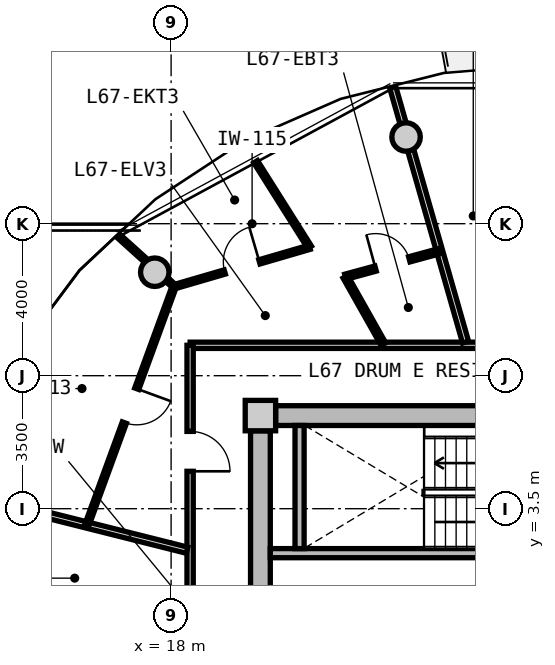
"""IFC4 building model, lengths in metres.
Left out: names, types, materials, properties, quantities, classifications, styles, units other than length and angle.
Written with IfcOpenShell. Run it as: python <this file> out.ifc"""

import sys

from ifc_helpers import new_model, si_unit, direction, frame, frame_2d, origin, origin_2d, place, context, subcontext, project, spatial, rectangle, circle, extrude, source, transform, mapped, element, fill, save


model = new_model("IFC4")
c1 = context("Model", 3, precision=1e-05, world=origin(), true_north=direction((0.0, 1.0)))
c2 = subcontext(c1, "Body", "Model", "MODEL_VIEW")
j1 = project(units=[si_unit("LENGTHUNIT", "METRE"), si_unit("PLANEANGLEUNIT", "RADIAN")], contexts=[c1])
p1 = place(None, origin())
s1 = spatial("IfcSite", under=j1, at=p1, CompositionType="ELEMENT")
p2 = place(p1, origin())
s2 = spatial("IfcBuilding", under=s1, at=p2, CompositionType="ELEMENT")
p3 = place(p2, frame((0.0, 0.0, 216.95)))
s3 = spatial("IfcBuildingStorey", under=s2, at=p3, CompositionType="ELEMENT", Elevation=216.95)
m1 = source(origin(), c2, "Body", "SweptSolid", [
    extrude(rectangle(XDim=0.8, YDim=0.8, at=origin_2d()), origin(), (0.0, 0.0, 1.0), 3.05),
])
p4 = place(p3, frame((20.35, 5.95, 0.0), z_axis=(0.0, 0.0, 1.0), x_axis=(1.0, 0.0, 0.0)))
e1 = element("IfcColumn", 1, at=p4, inside=s3, PredefinedType="COLUMN", context=c2, shape_type="MappedRepresentation", body=[
    mapped(m1, transform((0.0, 0.0, 0.0), x_axis=(1.0, 0.0, 0.0), y_axis=(0.0, 1.0, 0.0), z_axis=(0.0, 0.0, 1.0), scale=1.0)),
])
m2 = source(origin(), c2, "Body", "SweptSolid", [
    extrude(rectangle(XDim=14.5, YDim=0.52, at=frame_2d((7.25, 0.0))), origin(), (0.0, 0.0, 1.0), 2.76),
])
p5 = place(p3, frame((20.75, 5.95, 0.0), z_axis=(0.0, 0.0, 1.0), x_axis=(1.0, 0.0, 0.0)))
e2 = element("IfcWall", 2, at=p5, inside=s3, PredefinedType="SHEAR", context=c2, shape_type="MappedRepresentation", body=[
    mapped(m2, transform((0.0, 0.0, 0.0), x_axis=(1.0, 0.0, 0.0), y_axis=(0.0, 1.0, 0.0), z_axis=(0.0, 0.0, 1.0), scale=1.0)),
])
m3 = source(origin(), c2, "Body", "SweptSolid", [
    extrude(rectangle(XDim=11.1, YDim=0.52, at=frame_2d((5.55, 0.0))), origin(), (0.0, 0.0, 1.0), 2.76),
])
p6 = place(p3, frame((20.35, -5.55, 0.0), z_axis=(0.0, 0.0, 1.0), x_axis=(0.0, 1.0, 0.0)))
e3 = element("IfcWall", 3, at=p6, inside=s3, PredefinedType="SHEAR", context=c2, shape_type="MappedRepresentation", body=[
    mapped(m3, transform((0.0, 0.0, 0.0), x_axis=(1.0, 0.0, 0.0), y_axis=(0.0, 1.0, 0.0), z_axis=(0.0, 0.0, 1.0), scale=1.0)),
])
p7 = place(p6, frame((3.8, 0.0, 0.0)))
e4 = element("IfcOpeningElement", 4, at=p7, cuts=e3, PredefinedType="OPENING", context=c2, shape_type="SweptSolid", body=[
    extrude(rectangle(XDim=1.2, YDim=2.15, at=frame_2d((0.6, 1.075))), frame((0.0, 0.27, 0.0), z_axis=(0.0, -1.0, 0.0), x_axis=(1.0, 0.0, 0.0)), (0.0, 0.0, 1.0), 0.54),
])
m4 = source(origin(), c2, "Body", "SweptSolid", [
    extrude(circle(Radius=0.375, at=origin_2d()), origin(), (0.0, 0.0, 1.0), 3.05),
])
for number, where, z_axis, x_axis in (
    (5, (24.182, 13.281, 0.0), (0.0, 0.0, 1.0), (1.0, 0.0, 0.0)),
    (6, (17.57, 9.723, 0.0), (0.0, 0.0, 1.0), (1.0, 0.0, 0.0)),
):
    element("IfcColumn", number, at=place(p3, frame(where, z_axis=z_axis, x_axis=x_axis)), inside=s3, PredefinedType="COLUMN", context=c2, shape_type="MappedRepresentation", body=[
        mapped(m4, transform((0.0, 0.0, 0.0), x_axis=(1.0, 0.0, 0.0), y_axis=(0.0, 1.0, 0.0), z_axis=(0.0, 0.0, 1.0), scale=1.0)),
    ])
m5 = source(origin(), c2, "Body", "SweptSolid", [
    extrude(rectangle(XDim=7.93, YDim=0.24, at=frame_2d((3.965, 0.0))), origin(), (0.0, 0.0, 1.0), 2.76),
])
p8 = place(p3, frame((20.61, 2.33, 0.0), z_axis=(0.0, 0.0, 1.0), x_axis=(1.0, 0.0, 0.0)))
e7 = element("IfcWall", 7, at=p8, inside=s3, PredefinedType="PARTITIONING", context=c2, shape_type="MappedRepresentation", body=[
    mapped(m5, transform((0.0, 0.0, 0.0), x_axis=(1.0, 0.0, 0.0), y_axis=(0.0, 1.0, 0.0), z_axis=(0.0, 0.0, 1.0), scale=1.0)),
])
m6 = source(origin(), c2, "Body", "SweptSolid", [
    extrude(rectangle(XDim=3.24, YDim=0.24, at=frame_2d((1.62, 0.0))), origin(), (0.0, 0.0, 1.0), 2.76),
])
p9 = place(p3, frame((21.38, 2.45, 0.0), z_axis=(0.0, 0.0, 1.0), x_axis=(0.0, 1.0, 0.0)))
e8 = element("IfcWall", 8, at=p9, inside=s3, PredefinedType="PARTITIONING", context=c2, shape_type="MappedRepresentation", body=[
    mapped(m6, transform((0.0, 0.0, 0.0), x_axis=(1.0, 0.0, 0.0), y_axis=(0.0, 1.0, 0.0), z_axis=(0.0, 0.0, 1.0), scale=1.0)),
])
m7 = source(origin(), c2, "Body", "SweptSolid", [
    extrude(rectangle(XDim=8.58, YDim=0.165, at=frame_2d((4.29, 0.0))), origin(), (0.0, 0.0, 1.0), 2.745),
])
p10 = place(p3, frame((18.5, 7.8, 0.0), z_axis=(0.0, 0.0, 1.0), x_axis=(1.0, 0.0, 0.0)))
e9 = element("IfcWall", 9, at=p10, inside=s3, PredefinedType="PARTITIONING", context=c2, shape_type="MappedRepresentation", body=[
    mapped(m7, transform((0.0, 0.0, 0.0), x_axis=(1.0, 0.0, 0.0), y_axis=(0.0, 1.0, 0.0), z_axis=(0.0, 0.0, 1.0), scale=1.0)),
])
m8 = source(origin(), c2, "Body", "SweptSolid", [
    extrude(rectangle(XDim=6.88, YDim=0.165, at=frame_2d((3.44, 0.0))), origin(), (0.0, 0.0, 1.0), 2.745),
])
p11 = place(p3, frame((18.5, 0.92, 0.0), z_axis=(0.0, 0.0, 1.0), x_axis=(0.0, 1.0, 0.0)))
e10 = element("IfcWall", 10, at=p11, inside=s3, PredefinedType="PARTITIONING", context=c2, shape_type="MappedRepresentation", body=[
    mapped(m8, transform((0.0, 0.0, 0.0), x_axis=(1.0, 0.0, 0.0), y_axis=(0.0, 1.0, 0.0), z_axis=(0.0, 0.0, 1.0), scale=1.0)),
])
p12 = place(p11, frame((3.564, 0.0, 0.0)))
e11 = element("IfcOpeningElement", 11, at=p12, cuts=e10, PredefinedType="OPENING", context=c2, shape_type="SweptSolid", body=[
    extrude(rectangle(XDim=1.05, YDim=2.15, at=frame_2d((0.525, 1.075))), frame((0.0, 0.093, 0.0), z_axis=(0.0, -1.0, 0.0), x_axis=(1.0, 0.0, 0.0)), (0.0, 0.0, 1.0), 0.185),
])
m9 = source(origin(), c2, "Body", "SweptSolid", [
    extrude(rectangle(XDim=6.974, YDim=0.165, at=frame_2d((3.487, 0.0))), origin(), (0.0, 0.0, 1.0), 2.345),
])
p13 = place(p3, frame((25.749, 7.88, 0.0), z_axis=(0.0, 0.0, 1.0), x_axis=(-0.274707256801, 0.961527910703, 0.0)))
e12 = element("IfcWall", 12, at=p13, inside=s3, PredefinedType="PARTITIONING", context=c2, shape_type="MappedRepresentation", body=[
    mapped(m9, transform((0.0, 0.0, 0.0), x_axis=(1.0, 0.0, 0.0), y_axis=(0.0, 1.0, 0.0), z_axis=(0.0, 0.0, 1.0), scale=1.0)),
])
m10 = source(origin(), c2, "Body", "SweptSolid", [
    extrude(rectangle(XDim=6.157, YDim=0.165, at=frame_2d((3.079, 0.0))), origin(), (0.0, 0.0, 1.0), 2.345),
])
p14 = place(p3, frame((18.42, 2.407, 0.0), z_axis=(0.0, 0.0, 1.0), x_axis=(-0.969840867184, 0.243738984038, 0.0)))
e13 = element("IfcWall", 13, at=p14, inside=s3, PredefinedType="PARTITIONING", context=c2, shape_type="MappedRepresentation", body=[
    mapped(m10, transform((0.0, 0.0, 0.0), x_axis=(1.0, 0.0, 0.0), y_axis=(0.0, 1.0, 0.0), z_axis=(0.0, 0.0, 1.0), scale=1.0)),
])
m11 = source(origin(), c2, "Body", "SweptSolid", [
    extrude(rectangle(XDim=6.69, YDim=0.115, at=frame_2d((3.345, 0.0))), origin(), (0.0, 0.0, 1.0), 2.745),
])
p15 = place(p3, frame((18.083, 9.352, 0.0), z_axis=(0.0, 0.0, 1.0), x_axis=(-0.343693784919, -0.939081776102, 0.0)))
e14 = element("IfcWall", 14, at=p15, inside=s3, PredefinedType="PARTITIONING", context=c2, shape_type="MappedRepresentation", body=[
    mapped(m11, transform((0.0, 0.0, 0.0), x_axis=(1.0, 0.0, 0.0), y_axis=(0.0, 1.0, 0.0), z_axis=(0.0, 0.0, 1.0), scale=1.0)),
])
p16 = place(p15, frame((2.87, 0.0, 0.0)))
e15 = element("IfcOpeningElement", 15, at=p16, cuts=e14, PredefinedType="OPENING", context=c2, shape_type="SweptSolid", body=[
    extrude(rectangle(XDim=0.95, YDim=2.1, at=frame_2d((0.475, 1.05))), frame((0.0, 0.067, 0.0), z_axis=(0.0, -1.0, 0.0), x_axis=(1.0, 0.0, 0.0)), (0.0, 0.0, 1.0), 0.135),
])
m12 = source(origin(), c2, "Body", "SweptSolid", [
    extrude(rectangle(XDim=1.977, YDim=0.115, at=frame_2d((0.989, 0.0))), origin(), (0.0, 0.0, 1.0), 2.345),
])
p17 = place(p3, frame((18.083, 9.352, 0.0), z_axis=(0.0, 0.0, 1.0), x_axis=(-0.742064998629, 0.670327933037, 0.0)))
e16 = element("IfcWall", 16, at=p17, inside=s3, PredefinedType="PARTITIONING", context=c2, shape_type="MappedRepresentation", body=[
    mapped(m12, transform((0.0, 0.0, 0.0), x_axis=(1.0, 0.0, 0.0), y_axis=(0.0, 1.0, 0.0), z_axis=(0.0, 0.0, 1.0), scale=1.0)),
])
m13 = source(origin(), c2, "Body", "SweptSolid", [
    extrude(rectangle(XDim=2.035, YDim=0.14, at=frame_2d((1.018, 0.0))), origin(), (0.0, 0.0, 1.0), 2.745),
])
p18 = place(p3, frame((23.585, 7.83, 0.0), z_axis=(0.0, 0.0, 1.0), x_axis=(-0.491092509169, 0.871107425888, 0.0)))
e17 = element("IfcWall", 17, at=p18, inside=s3, PredefinedType="PARTITIONING", context=c2, shape_type="MappedRepresentation", body=[
    mapped(m13, transform((0.0, 0.0, 0.0), x_axis=(1.0, 0.0, 0.0), y_axis=(0.0, 1.0, 0.0), z_axis=(0.0, 0.0, 1.0), scale=1.0)),
])
m14 = source(origin(), c2, "Body", "SweptSolid", [
    extrude(rectangle(XDim=2.568, YDim=0.14, at=frame_2d((1.284, 0.0))), origin(), (0.0, 0.0, 1.0), 2.745),
])
p19 = place(p3, frame((22.585, 9.603, 0.0), z_axis=(0.0, 0.0, 1.0), x_axis=(0.964796726679, 0.262996722775, 0.0)))
e18 = element("IfcWall", 18, at=p19, inside=s3, PredefinedType="PARTITIONING", context=c2, shape_type="MappedRepresentation", body=[
    mapped(m14, transform((0.0, 0.0, 0.0), x_axis=(1.0, 0.0, 0.0), y_axis=(0.0, 1.0, 0.0), z_axis=(0.0, 0.0, 1.0), scale=1.0)),
])
p20 = place(p19, frame((0.824, 0.0, 0.0)))
e19 = element("IfcOpeningElement", 19, at=p20, cuts=e18, PredefinedType="OPENING", context=c2, shape_type="SweptSolid", body=[
    extrude(rectangle(XDim=0.92, YDim=2.1, at=frame_2d((0.46, 1.05))), frame((0.0, 0.08, 0.0), z_axis=(0.0, -1.0, 0.0), x_axis=(1.0, 0.0, 0.0)), (0.0, 0.0, 1.0), 0.16),
])
m15 = source(origin(), c2, "Body", "SweptSolid", [
    extrude(rectangle(XDim=2.662, YDim=0.115, at=frame_2d((1.331, 0.0))), origin(), (0.0, 0.0, 1.0), 2.745),
])
p21 = place(p3, frame((21.645, 10.38, 0.0), z_axis=(0.0, 0.0, 1.0), x_axis=(-0.533547747092, 0.845769946009, 0.0)))
e20 = element("IfcWall", 20, at=p21, inside=s3, PredefinedType="PARTITIONING", context=c2, shape_type="MappedRepresentation", body=[
    mapped(m15, transform((0.0, 0.0, 0.0), x_axis=(1.0, 0.0, 0.0), y_axis=(0.0, 1.0, 0.0), z_axis=(0.0, 0.0, 1.0), scale=1.0)),
])
m16 = source(origin(), c2, "Body", "SweptSolid", [
    extrude(rectangle(XDim=3.702, YDim=0.115, at=frame_2d((1.851, 0.0))), origin(), (0.0, 0.0, 1.0), 2.745),
])
p22 = place(p3, frame((21.645, 10.38, 0.0), z_axis=(0.0, 0.0, 1.0), x_axis=(-0.960044309887, -0.279848035645, 0.0)))
e21 = element("IfcWall", 21, at=p22, inside=s3, PredefinedType="PARTITIONING", context=c2, shape_type="MappedRepresentation", body=[
    mapped(m16, transform((0.0, 0.0, 0.0), x_axis=(1.0, 0.0, 0.0), y_axis=(0.0, 1.0, 0.0), z_axis=(0.0, 0.0, 1.0), scale=1.0)),
])
p23 = place(p22, frame((1.376, 0.0, 0.0)))
e22 = element("IfcOpeningElement", 22, at=p23, cuts=e21, PredefinedType="OPENING", context=c2, shape_type="SweptSolid", body=[
    extrude(rectangle(XDim=0.95, YDim=2.1, at=frame_2d((0.475, 1.05))), frame((0.0, 0.067, 0.0), z_axis=(0.0, -1.0, 0.0), x_axis=(1.0, 0.0, 0.0)), (0.0, 0.0, 1.0), 0.135),
])
m17 = source(origin(), c2, "Body", "SweptSolid", [
    extrude(rectangle(XDim=1.05, YDim=2.15, at=frame_2d((0.525, 1.075))), frame((0.0, 0.025, 0.0), z_axis=(0.0, -1.0, 0.0), x_axis=(1.0, 0.0, 0.0)), (0.0, 0.0, 1.0), 0.05),
])
p24 = place(p12, frame((1.05, 0.0, 0.0), z_axis=(0.0, 0.0, 1.0), x_axis=(-1.0, 0.0, 0.0)))
e23 = element("IfcDoor", 23, at=p24, inside=s3, OperationType="SINGLE_SWING_RIGHT", PredefinedType="DOOR", context=c2, shape_type="MappedRepresentation", body=[
    mapped(m17, transform((0.0, 0.0, 0.0), x_axis=(1.0, 0.0, 0.0), y_axis=(0.0, 1.0, 0.0), z_axis=(0.0, 0.0, 1.0), scale=1.0)),
])
fill(e11, e23)
m18 = source(origin(), c2, "Body", "SweptSolid", [
    extrude(rectangle(XDim=0.92, YDim=2.1, at=frame_2d((0.46, 1.05))), frame((0.0, 0.025, 0.0), z_axis=(0.0, -1.0, 0.0), x_axis=(1.0, 0.0, 0.0)), (0.0, 0.0, 1.0), 0.05),
])
p25 = place(p20, origin())
e24 = element("IfcDoor", 24, at=p25, inside=s3, OperationType="SINGLE_SWING_LEFT", PredefinedType="DOOR", context=c2, shape_type="MappedRepresentation", body=[
    mapped(m18, transform((0.0, 0.0, 0.0), x_axis=(1.0, 0.0, 0.0), y_axis=(0.0, 1.0, 0.0), z_axis=(0.0, 0.0, 1.0), scale=1.0)),
])
fill(e19, e24)
m19 = source(origin(), c2, "Body", "SweptSolid", [
    extrude(rectangle(XDim=0.95, YDim=2.1, at=frame_2d((0.475, 1.05))), frame((0.0, 0.025, 0.0), z_axis=(0.0, -1.0, 0.0), x_axis=(1.0, 0.0, 0.0)), (0.0, 0.0, 1.0), 0.05),
])
p26 = place(p23, frame((0.95, 0.0, 0.0), z_axis=(0.0, 0.0, 1.0), x_axis=(-1.0, 0.0, 0.0)))
e25 = element("IfcDoor", 25, at=p26, inside=s3, OperationType="SINGLE_SWING_RIGHT", PredefinedType="DOOR", context=c2, shape_type="MappedRepresentation", body=[
    mapped(m19, transform((0.0, 0.0, 0.0), x_axis=(1.0, 0.0, 0.0), y_axis=(0.0, 1.0, 0.0), z_axis=(0.0, 0.0, 1.0), scale=1.0)),
])
fill(e22, e25)
p27 = place(p16, origin())
e26 = element("IfcDoor", 26, at=p27, inside=s3, OperationType="SINGLE_SWING_LEFT", PredefinedType="DOOR", context=c2, shape_type="MappedRepresentation", body=[
    mapped(m19, transform((0.0, 0.0, 0.0), x_axis=(1.0, 0.0, 0.0), y_axis=(0.0, 1.0, 0.0), z_axis=(0.0, 0.0, 1.0), scale=1.0)),
])
fill(e15, e26)
save(model, sys.argv[1])
